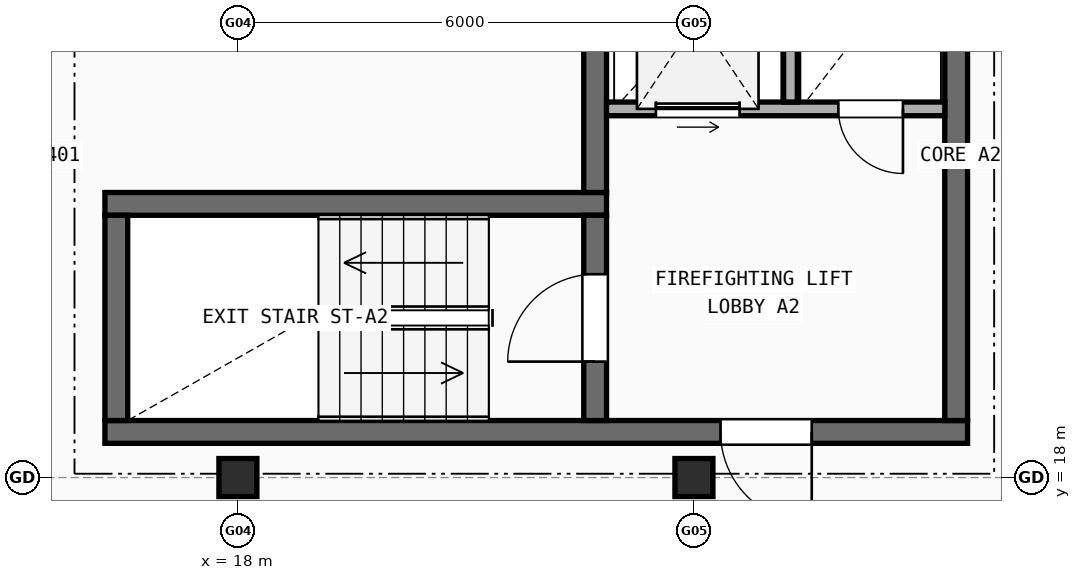
"""IFC4 building model, lengths in metres.
Left out: names, types, materials, properties, quantities, classifications, styles, units other than length and angle.
Written with IfcOpenShell. Run it as: python <this file> out.ifc"""

import sys

from ifc_helpers import new_model, si_unit, direction, frame, frame_2d, origin, origin_2d, place, context, subcontext, project, spatial, rectangle, extrude, element, fill, save


model = new_model("IFC4")
c1 = context("Model", 3, precision=1e-05, world=origin(), true_north=direction((0.0, 1.0)))
c2 = subcontext(c1, "Body", "Model", "MODEL_VIEW")
j1 = project(units=[si_unit("LENGTHUNIT", "METRE"), si_unit("PLANEANGLEUNIT", "RADIAN")], contexts=[c1])
p1 = place(None, origin())
s1 = spatial("IfcSite", under=j1, at=p1, CompositionType="ELEMENT")
p2 = place(p1, origin())
s2 = spatial("IfcBuilding", under=s1, at=p2, CompositionType="ELEMENT")
p3 = place(p2, frame((0.0, 0.0, 33.3)))
s3 = spatial("IfcBuildingStorey", under=s2, at=p3, CompositionType="ELEMENT", Elevation=33.3)
for number, where, z_axis, x_axis in (
    (1, (18.0, 18.0, 0.0), (0.0, 0.0, 1.0), (1.0, 0.0, 0.0)),
    (2, (24.0, 18.0, 0.0), (0.0, 0.0, 1.0), (1.0, 0.0, 0.0)),
):
    element("IfcColumn", number, at=place(p3, frame(where, z_axis=z_axis, x_axis=x_axis)), inside=s3, PredefinedType="COLUMN", context=c2, shape_type="SweptSolid", body=[
        extrude(rectangle(XDim=0.5, YDim=0.5, at=origin_2d()), origin(), (0.0, 0.0, 1.0), 2.99),
    ])
p4 = place(p3, frame((16.25, 18.6, 0.0), z_axis=(0.0, 0.0, 1.0), x_axis=(1.0, 0.0, 0.0)))
e3 = element("IfcWall", 3, at=p4, inside=s3, PredefinedType="SHEAR", context=c2, shape_type="SweptSolid", body=[
    extrude(rectangle(XDim=11.35, YDim=0.3, at=frame_2d((5.675, 0.0))), origin(), (0.0, 0.0, 1.0), 2.99),
])
p5 = place(p4, frame((8.1, 0.0, 0.0)))
e4 = element("IfcOpeningElement", 4, at=p5, cuts=e3, PredefinedType="OPENING", context=c2, shape_type="SweptSolid", body=[
    extrude(rectangle(XDim=1.2, YDim=2.15, at=frame_2d((0.6, 1.075))), frame((0.0, 0.16, 0.0), z_axis=(0.0, -1.0, 0.0), x_axis=(1.0, 0.0, 0.0)), (0.0, 0.0, 1.0), 0.32),
])
p6 = place(p3, frame((22.85, 21.6, 0.0), z_axis=(0.0, 0.0, 1.0), x_axis=(-1.0, 0.0, 0.0)))
e5 = element("IfcWall", 5, at=p6, inside=s3, PredefinedType="SHEAR", context=c2, shape_type="SweptSolid", body=[
    extrude(rectangle(XDim=6.6, YDim=0.3, at=frame_2d((3.3, 0.0))), origin(), (0.0, 0.0, 1.0), 2.99),
])
p7 = place(p3, frame((16.4, 21.45, 0.0), z_axis=(0.0, 0.0, 1.0), x_axis=(0.0, -1.0, 0.0)))
e6 = element("IfcWall", 6, at=p7, inside=s3, PredefinedType="SHEAR", context=c2, shape_type="SweptSolid", body=[
    extrude(rectangle(XDim=2.7, YDim=0.3, at=frame_2d((1.35, 0.0))), origin(), (0.0, 0.0, 1.0), 2.99),
])
p8 = place(p3, frame((22.7, 18.75, 0.0), z_axis=(0.0, 0.0, 1.0), x_axis=(0.0, 1.0, 0.0)))
e7 = element("IfcWall", 7, at=p8, inside=s3, PredefinedType="SHEAR", context=c2, shape_type="SweptSolid", body=[
    extrude(rectangle(XDim=2.7, YDim=0.3, at=frame_2d((1.35, 0.0))), origin(), (0.0, 0.0, 1.0), 2.99),
])
p9 = place(p8, frame((0.775, 0.0, 0.0)))
e8 = element("IfcOpeningElement", 8, at=p9, cuts=e7, PredefinedType="OPENING", context=c2, shape_type="SweptSolid", body=[
    extrude(rectangle(XDim=1.15, YDim=2.15, at=frame_2d((0.575, 1.075))), frame((0.0, 0.16, 0.0), z_axis=(0.0, -1.0, 0.0), x_axis=(1.0, 0.0, 0.0)), (0.0, 0.0, 1.0), 0.32),
])
p10 = place(p3, frame((27.45, 18.75, 0.0), z_axis=(0.0, 0.0, 1.0), x_axis=(0.0, 1.0, 0.0)))
e9 = element("IfcWall", 9, at=p10, inside=s3, PredefinedType="SHEAR", context=c2, shape_type="SweptSolid", body=[
    extrude(rectangle(XDim=6.45, YDim=0.3, at=frame_2d((3.225, 0.0))), origin(), (0.0, 0.0, 1.0), 2.99),
])
p11 = place(p3, frame((22.7, 21.75, 0.0), z_axis=(0.0, 0.0, 1.0), x_axis=(0.0, 1.0, 0.0)))
e10 = element("IfcWall", 10, at=p11, inside=s3, PredefinedType="SHEAR", context=c2, shape_type="SweptSolid", body=[
    extrude(rectangle(XDim=3.45, YDim=0.3, at=frame_2d((1.725, 0.0))), origin(), (0.0, 0.0, 1.0), 2.99),
])
p12 = place(p3, frame((22.85, 22.85, 0.0), z_axis=(0.0, 0.0, 1.0), x_axis=(1.0, 0.0, 0.0)))
e11 = element("IfcWall", 11, at=p12, inside=s3, PredefinedType="SOLIDWALL", context=c2, shape_type="SweptSolid", body=[
    extrude(rectangle(XDim=4.45, YDim=0.18, at=frame_2d((2.225, 0.0))), origin(), (0.0, 0.0, 1.0), 2.99),
])
p13 = place(p12, frame((0.65, 0.0, 0.0)))
e12 = element("IfcOpeningElement", 12, at=p13, cuts=e11, PredefinedType="OPENING", context=c2, shape_type="SweptSolid", body=[
    extrude(rectangle(XDim=1.1, YDim=2.15, at=frame_2d((0.55, 1.075))), frame((0.0, 0.1, 0.0), z_axis=(0.0, -1.0, 0.0), x_axis=(1.0, 0.0, 0.0)), (0.0, 0.0, 1.0), 0.2),
])
p14 = place(p12, frame((3.05, 0.0, 0.0)))
e13 = element("IfcOpeningElement", 13, at=p14, cuts=e11, PredefinedType="OPENING", context=c2, shape_type="SweptSolid", body=[
    extrude(rectangle(XDim=0.85, YDim=2.1, at=frame_2d((0.425, 1.05))), frame((0.0, 0.1, 0.0), z_axis=(0.0, -1.0, 0.0), x_axis=(1.0, 0.0, 0.0)), (0.0, 0.0, 1.0), 0.2),
])
p15 = place(p3, frame((25.27, 22.94, 0.0), z_axis=(0.0, 0.0, 1.0), x_axis=(0.0, 1.0, 0.0)))
e14 = element("IfcWall", 14, at=p15, inside=s3, PredefinedType="SOLIDWALL", context=c2, shape_type="SweptSolid", body=[
    extrude(rectangle(XDim=2.26, YDim=0.18, at=frame_2d((1.13, 0.0))), origin(), (0.0, 0.0, 1.0), 2.99),
])
p16 = place(p5, origin())
e15 = element("IfcDoor", 15, at=p16, inside=s3, OperationType="SINGLE_SWING_RIGHT", PredefinedType="DOOR", context=c2, shape_type="SweptSolid", body=[
    extrude(rectangle(XDim=1.2, YDim=2.15, at=frame_2d((0.6, 1.075))), frame((0.0, 0.025, 0.0), z_axis=(0.0, -1.0, 0.0), x_axis=(1.0, 0.0, 0.0)), (0.0, 0.0, 1.0), 0.05),
])
fill(e4, e15)
p17 = place(p9, origin())
e16 = element("IfcDoor", 16, at=p17, inside=s3, OperationType="SINGLE_SWING_LEFT", PredefinedType="DOOR", context=c2, shape_type="SweptSolid", body=[
    extrude(rectangle(XDim=1.15, YDim=2.15, at=frame_2d((0.575, 1.075))), frame((0.0, 0.025, 0.0), z_axis=(0.0, -1.0, 0.0), x_axis=(1.0, 0.0, 0.0)), (0.0, 0.0, 1.0), 0.05),
])
fill(e8, e16)
p18 = place(p13, origin())
e17 = element("IfcDoor", 17, at=p18, inside=s3, OperationType="SLIDING_TO_LEFT", PredefinedType="DOOR", context=c2, shape_type="SweptSolid", body=[
    extrude(rectangle(XDim=1.1, YDim=2.15, at=frame_2d((0.55, 1.075))), frame((0.0, 0.025, 0.0), z_axis=(0.0, -1.0, 0.0), x_axis=(1.0, 0.0, 0.0)), (0.0, 0.0, 1.0), 0.05),
])
fill(e12, e17)
p19 = place(p14, frame((0.85, 0.0, 0.0), z_axis=(0.0, 0.0, 1.0), x_axis=(-1.0, 0.0, 0.0)))
e18 = element("IfcDoor", 18, at=p19, inside=s3, OperationType="SINGLE_SWING_RIGHT", PredefinedType="DOOR", context=c2, shape_type="SweptSolid", body=[
    extrude(rectangle(XDim=0.85, YDim=2.1, at=frame_2d((0.425, 1.05))), frame((0.0, 0.025, 0.0), z_axis=(0.0, -1.0, 0.0), x_axis=(1.0, 0.0, 0.0)), (0.0, 0.0, 1.0), 0.05),
])
fill(e13, e18)
save(model, sys.argv[1])
